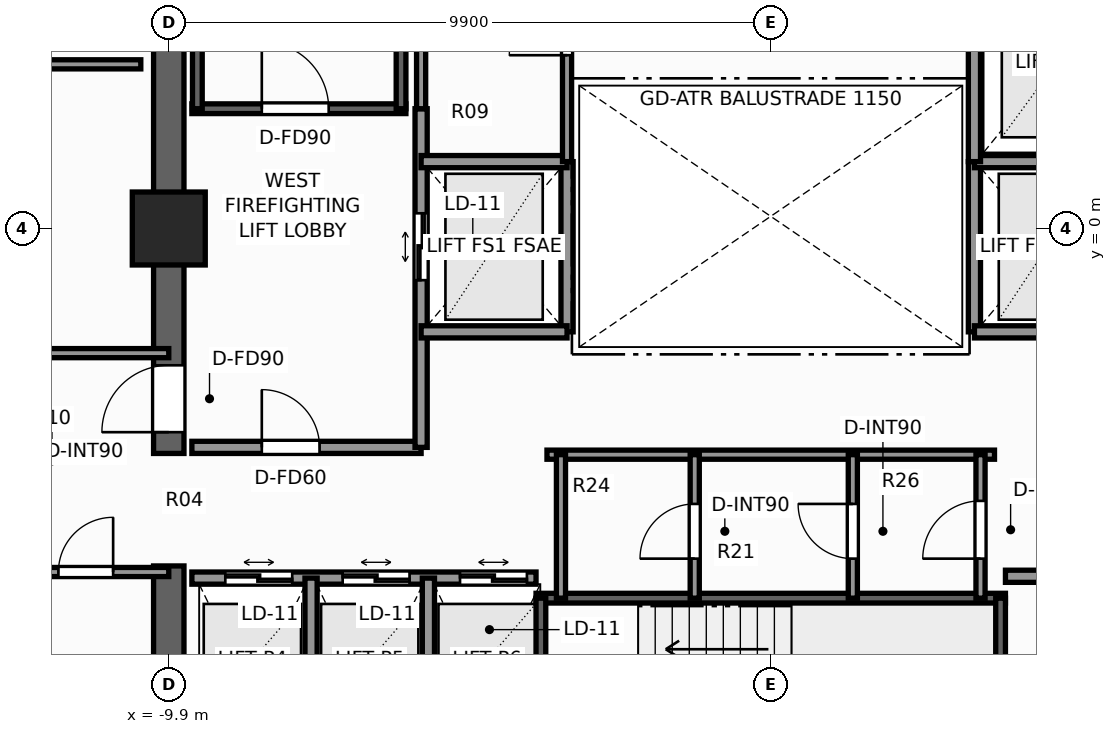
"""IFC4 building model, lengths in metres.
Left out: names, types, materials, properties, quantities, classifications, styles, units other than length and angle.
Written with IfcOpenShell. Run it as: python <this file> out.ifc"""

import sys

from ifc_helpers import new_model, si_unit, direction, frame, frame_2d, origin, origin_2d, place, context, subcontext, project, spatial, rectangle, extrude, element, fill, save


model = new_model("IFC4")
c1 = context("Model", 3, precision=1e-05, world=origin(), true_north=direction((0.0, 1.0)))
c2 = subcontext(c1, "Body", "Model", "MODEL_VIEW")
j1 = project(units=[si_unit("LENGTHUNIT", "METRE"), si_unit("PLANEANGLEUNIT", "RADIAN")], contexts=[c1])
p1 = place(None, origin())
s1 = spatial("IfcSite", under=j1, at=p1, CompositionType="ELEMENT")
p2 = place(p1, origin())
s2 = spatial("IfcBuilding", under=s1, at=p2, CompositionType="ELEMENT")
p3 = place(p2, frame((0.0, 0.0, 111.8)))
s3 = spatial("IfcBuildingStorey", under=s2, at=p3, CompositionType="ELEMENT", Elevation=111.8)
p4 = place(p3, frame((-9.9, -9.65, 0.0), z_axis=(0.0, 0.0, 1.0), x_axis=(0.0, 1.0, 0.0)))
e1 = element("IfcWall", 1, at=p4, inside=s3, PredefinedType="SHEAR", context=c2, shape_type="SweptSolid", body=[
    extrude(rectangle(XDim=4.1, YDim=0.5, at=frame_2d((2.05, 0.0))), origin(), (0.0, 0.0, 1.0), 3.3),
])
p5 = place(p3, frame((-9.9, -3.7, 0.0), z_axis=(0.0, 0.0, 1.0), x_axis=(0.0, 1.0, 0.0)))
e2 = element("IfcWall", 2, at=p5, inside=s3, PredefinedType="SHEAR", context=c2, shape_type="SweptSolid", body=[
    extrude(rectangle(XDim=13.35, YDim=0.5, at=frame_2d((6.675, 0.0))), origin(), (0.0, 0.0, 1.0), 3.3),
])
p6 = place(p5, frame((0.35, 0.0, 0.0)))
e3 = element("IfcOpeningElement", 3, at=p6, cuts=e2, PredefinedType="OPENING", context=c2, shape_type="SweptSolid", body=[
    extrude(rectangle(XDim=1.1, YDim=2.2, at=frame_2d((0.55, 1.1))), frame((0.0, 0.26, 0.0), z_axis=(0.0, -1.0, 0.0), x_axis=(1.0, 0.0, 0.0)), (0.0, 0.0, 1.0), 0.52),
])
p7 = place(p3, frame((-9.9, 0.0, 0.0), z_axis=(0.0, 0.0, 1.0), x_axis=(1.0, 0.0, 0.0)))
e4 = element("IfcColumn", 4, at=p7, inside=s3, PredefinedType="COLUMN", context=c2, shape_type="SweptSolid", body=[
    extrude(rectangle(XDim=1.2, YDim=1.2, at=origin_2d()), origin(), (0.0, 0.0, 1.0), 3.3),
])
p8 = place(p3, frame((-9.52, 1.97, 0.0), z_axis=(0.0, 0.0, 1.0), x_axis=(1.0, 0.0, 0.0)))
e5 = element("IfcWall", 5, at=p8, inside=s3, PredefinedType="SHEAR", context=c2, shape_type="SweptSolid", body=[
    extrude(rectangle(XDim=3.52, YDim=0.16, at=frame_2d((1.76, 0.0))), origin(), (0.0, 0.0, 1.0), 3.3),
])
p9 = place(p8, frame((1.15, 0.0, 0.0)))
e6 = element("IfcOpeningElement", 6, at=p9, cuts=e5, PredefinedType="OPENING", context=c2, shape_type="SweptSolid", body=[
    extrude(rectangle(XDim=1.1, YDim=2.2, at=frame_2d((0.55, 1.1))), frame((0.0, 0.09, 0.0), z_axis=(0.0, -1.0, 0.0), x_axis=(1.0, 0.0, 0.0)), (0.0, 0.0, 1.0), 0.18),
])
for number, where, z_axis, x_axis in (
    (7, (-9.43, 1.97, 0.0), (0.0, 0.0, 1.0), (0.0, 1.0, 0.0)),
    (8, (-6.08, 1.97, 0.0), (0.0, 0.0, 1.0), (0.0, 1.0, 0.0)),
):
    element("IfcWall", number, at=place(p3, frame(where, z_axis=z_axis, x_axis=x_axis)), inside=s3, PredefinedType="SHEAR", context=c2, shape_type="SweptSolid", body=[
        extrude(rectangle(XDim=7.56, YDim=0.16, at=frame_2d((3.78, 0.0))), origin(), (0.0, 0.0, 1.0), 3.3),
    ])
p10 = place(p3, frame((-3.86, -6.08, 0.0), z_axis=(0.0, 0.0, 1.0), x_axis=(1.0, 0.0, 0.0)))
e9 = element("IfcWall", 9, at=p10, inside=s3, PredefinedType="SHEAR", context=c2, shape_type="SweptSolid", body=[
    extrude(rectangle(XDim=7.72, YDim=0.16, at=frame_2d((3.86, 0.0))), origin(), (0.0, 0.0, 1.0), 3.3),
])
for number, where, z_axis, x_axis in (
    (10, (-3.78, -9.43, 0.0), (0.0, 0.0, 1.0), (0.0, 1.0, 0.0)),
    (11, (3.78, -9.43, 0.0), (0.0, 0.0, 1.0), (0.0, 1.0, 0.0)),
):
    element("IfcWall", number, at=place(p3, frame(where, z_axis=z_axis, x_axis=x_axis)), inside=s3, PredefinedType="SHEAR", context=c2, shape_type="SweptSolid", body=[
        extrude(rectangle(XDim=3.35, YDim=0.16, at=frame_2d((1.675, 0.0))), origin(), (0.0, 0.0, 1.0), 3.3),
    ])
p11 = place(p3, frame((-9.52, -3.6, 0.0), z_axis=(0.0, 0.0, 1.0), x_axis=(1.0, 0.0, 0.0)))
e12 = element("IfcWall", 12, at=p11, inside=s3, PredefinedType="SOLIDWALL", context=c2, shape_type="SweptSolid", body=[
    extrude(rectangle(XDim=3.77, YDim=0.2, at=frame_2d((1.885, 0.0))), origin(), (0.0, 0.0, 1.0), 3.08),
])
p12 = place(p11, frame((1.15, 0.0, 0.0)))
e13 = element("IfcOpeningElement", 13, at=p12, cuts=e12, PredefinedType="OPENING", context=c2, shape_type="SweptSolid", body=[
    extrude(rectangle(XDim=0.95, YDim=2.06, at=frame_2d((0.475, 1.03))), frame((0.0, 0.11, 0.0), z_axis=(0.0, -1.0, 0.0), x_axis=(1.0, 0.0, 0.0)), (0.0, 0.0, 1.0), 0.22),
])
p13 = place(p3, frame((-5.75, -3.6, 0.0), z_axis=(0.0, 0.0, 1.0), x_axis=(0.0, 1.0, 0.0)))
e14 = element("IfcWall", 14, at=p13, inside=s3, PredefinedType="SOLIDWALL", context=c2, shape_type="SweptSolid", body=[
    extrude(rectangle(XDim=5.57, YDim=0.2, at=frame_2d((2.785, 0.0))), origin(), (0.0, 0.0, 1.0), 2.715),
])
p14 = place(p13, frame((2.75, 0.0, 0.0)))
e15 = element("IfcOpeningElement", 15, at=p14, cuts=e14, PredefinedType="OPENING", context=c2, shape_type="SweptSolid", body=[
    extrude(rectangle(XDim=1.1, YDim=2.2, at=frame_2d((0.55, 1.1))), frame((0.0, 0.11, 0.0), z_axis=(0.0, -1.0, 0.0), x_axis=(1.0, 0.0, 0.0)), (0.0, 0.0, 1.0), 0.22),
])
p15 = place(p3, frame((-3.35, -1.7, 0.0), z_axis=(0.0, 0.0, 1.0), x_axis=(0.0, 1.0, 0.0)))
e16 = element("IfcWall", 16, at=p15, inside=s3, PredefinedType="SOLIDWALL", context=c2, shape_type="SweptSolid", body=[
    extrude(rectangle(XDim=2.8, YDim=0.2, at=frame_2d((1.4, 0.0))), origin(), (0.0, 0.0, 1.0), 2.715),
])
for number, where, z_axis, x_axis in (
    (17, (-5.75, -1.7, 0.0), (0.0, 0.0, 1.0), (1.0, 0.0, 0.0)),
    (18, (-5.75, 1.1, 0.0), (0.0, 0.0, 1.0), (1.0, 0.0, 0.0)),
):
    element("IfcWall", number, at=place(p3, frame(where, z_axis=z_axis, x_axis=x_axis)), inside=s3, PredefinedType="SOLIDWALL", context=c2, shape_type="SweptSolid", body=[
        extrude(rectangle(XDim=2.4, YDim=0.2, at=frame_2d((1.2, 0.0))), origin(), (0.0, 0.0, 1.0), 3.08),
    ])
p16 = place(p3, frame((3.35, -1.7, 0.0), z_axis=(0.0, 0.0, 1.0), x_axis=(0.0, 1.0, 0.0)))
e19 = element("IfcWall", 19, at=p16, inside=s3, PredefinedType="SOLIDWALL", context=c2, shape_type="SweptSolid", body=[
    extrude(rectangle(XDim=2.8, YDim=0.2, at=frame_2d((1.4, 0.0))), origin(), (0.0, 0.0, 1.0), 2.715),
])
for number, where, z_axis, x_axis in (
    (20, (3.35, -1.7, 0.0), (0.0, 0.0, 1.0), (1.0, 0.0, 0.0)),
    (21, (3.35, 1.1, 0.0), (0.0, 0.0, 1.0), (1.0, 0.0, 0.0)),
):
    element("IfcWall", number, at=place(p3, frame(where, z_axis=z_axis, x_axis=x_axis)), inside=s3, PredefinedType="SOLIDWALL", context=c2, shape_type="SweptSolid", body=[
        extrude(rectangle(XDim=2.4, YDim=0.2, at=frame_2d((1.2, 0.0))), origin(), (0.0, 0.0, 1.0), 3.08),
    ])
p17 = place(p3, frame((3.35, 1.1, 0.0), z_axis=(0.0, 0.0, 1.0), x_axis=(0.0, 1.0, 0.0)))
e22 = element("IfcWall", 22, at=p17, inside=s3, PredefinedType="SOLIDWALL", context=c2, shape_type="SweptSolid", body=[
    extrude(rectangle(XDim=3.2, YDim=0.2, at=frame_2d((1.6, 0.0))), origin(), (0.0, 0.0, 1.0), 2.715),
])
p18 = place(p3, frame((-9.52, -5.75, 0.0), z_axis=(0.0, 0.0, 1.0), x_axis=(1.0, 0.0, 0.0)))
e23 = element("IfcWall", 23, at=p18, inside=s3, PredefinedType="SOLIDWALL", context=c2, shape_type="SweptSolid", body=[
    extrude(rectangle(XDim=5.66, YDim=0.2, at=frame_2d((2.83, 0.0))), origin(), (0.0, 0.0, 1.0), 3.08),
])
p19 = place(p18, frame((0.55, 0.0, 0.0)))
e24 = element("IfcOpeningElement", 24, at=p19, cuts=e23, PredefinedType="OPENING", context=c2, shape_type="SweptSolid", body=[
    extrude(rectangle(XDim=1.1, YDim=2.2, at=frame_2d((0.55, 1.1))), frame((0.0, 0.11, 0.0), z_axis=(0.0, -1.0, 0.0), x_axis=(1.0, 0.0, 0.0)), (0.0, 0.0, 1.0), 0.22),
])
p20 = place(p18, frame((2.48, 0.0, 0.0)))
e25 = element("IfcOpeningElement", 25, at=p20, cuts=e23, PredefinedType="OPENING", context=c2, shape_type="SweptSolid", body=[
    extrude(rectangle(XDim=1.1, YDim=2.2, at=frame_2d((0.55, 1.1))), frame((0.0, 0.11, 0.0), z_axis=(0.0, -1.0, 0.0), x_axis=(1.0, 0.0, 0.0)), (0.0, 0.0, 1.0), 0.22),
])
p21 = place(p18, frame((4.41, 0.0, 0.0)))
e26 = element("IfcOpeningElement", 26, at=p21, cuts=e23, PredefinedType="OPENING", context=c2, shape_type="SweptSolid", body=[
    extrude(rectangle(XDim=1.1, YDim=2.2, at=frame_2d((0.55, 1.1))), frame((0.0, 0.11, 0.0), z_axis=(0.0, -1.0, 0.0), x_axis=(1.0, 0.0, 0.0)), (0.0, 0.0, 1.0), 0.22),
])
for number, where, z_axis, x_axis in (
    (27, (-7.56, -9.52, 0.0), (0.0, 0.0, 1.0), (0.0, 1.0, 0.0)),
    (28, (-5.63, -9.52, 0.0), (0.0, 0.0, 1.0), (0.0, 1.0, 0.0)),
):
    element("IfcWall", number, at=place(p3, frame(where, z_axis=z_axis, x_axis=x_axis)), inside=s3, PredefinedType="SOLIDWALL", context=c2, shape_type="SweptSolid", body=[
        extrude(rectangle(XDim=3.77, YDim=0.2, at=frame_2d((1.885, 0.0))), origin(), (0.0, 0.0, 1.0), 3.08),
    ])
p22 = place(p3, frame((3.86, -5.72, 0.0), z_axis=(0.0, 0.0, 1.0), x_axis=(1.0, 0.0, 0.0)))
e29 = element("IfcWall", 29, at=p22, inside=s3, PredefinedType="SOLIDWALL", context=c2, shape_type="SweptSolid", body=[
    extrude(rectangle(XDim=5.66, YDim=0.2, at=frame_2d((2.83, 0.0))), origin(), (0.0, 0.0, 1.0), 3.08),
])
p23 = place(p22, frame((0.85, 0.0, 0.0)))
e30 = element("IfcOpeningElement", 30, at=p23, cuts=e29, PredefinedType="OPENING", context=c2, shape_type="SweptSolid", body=[
    extrude(rectangle(XDim=0.95, YDim=2.06, at=frame_2d((0.475, 1.03))), frame((0.0, 0.11, 0.0), z_axis=(0.0, -1.0, 0.0), x_axis=(1.0, 0.0, 0.0)), (0.0, 0.0, 1.0), 0.22),
])
p24 = place(p22, frame((3.6, 0.0, 0.0)))
e31 = element("IfcOpeningElement", 31, at=p24, cuts=e29, PredefinedType="OPENING", context=c2, shape_type="SweptSolid", body=[
    extrude(rectangle(XDim=0.85, YDim=2.03, at=frame_2d((0.425, 1.015))), frame((0.0, 0.11, 0.0), z_axis=(0.0, -1.0, 0.0), x_axis=(1.0, 0.0, 0.0)), (0.0, 0.0, 1.0), 0.22),
])
p25 = place(p3, frame((-3.68, -3.72, 0.0), z_axis=(0.0, 0.0, 1.0), x_axis=(1.0, 0.0, 0.0)))
e32 = element("IfcWall", 32, at=p25, inside=s3, PredefinedType="PARTITIONING", context=c2, shape_type="SweptSolid", body=[
    extrude(rectangle(XDim=7.36, YDim=0.15, at=frame_2d((3.68, 0.0))), origin(), (0.0, 0.0, 1.0), 3.08),
])
p26 = place(p3, frame((3.45, -6.08, 0.0), z_axis=(0.0, 0.0, 1.0), x_axis=(0.0, 1.0, 0.0)))
e33 = element("IfcWall", 33, at=p26, inside=s3, PredefinedType="PARTITIONING", context=c2, shape_type="SweptSolid", body=[
    extrude(rectangle(XDim=2.36, YDim=0.15, at=frame_2d((1.18, 0.0))), origin(), (0.0, 0.0, 1.0), 3.08),
])
p27 = place(p26, frame((0.65, 0.0, 0.0)))
e34 = element("IfcOpeningElement", 34, at=p27, cuts=e33, PredefinedType="OPENING", context=c2, shape_type="SweptSolid", body=[
    extrude(rectangle(XDim=0.95, YDim=2.06, at=frame_2d((0.475, 1.03))), frame((0.0, 0.085, 0.0), z_axis=(0.0, -1.0, 0.0), x_axis=(1.0, 0.0, 0.0)), (0.0, 0.0, 1.0), 0.17),
])
p28 = place(p3, frame((-3.45, -6.08, 0.0), z_axis=(0.0, 0.0, 1.0), x_axis=(0.0, 1.0, 0.0)))
e35 = element("IfcWall", 35, at=p28, inside=s3, PredefinedType="PARTITIONING", context=c2, shape_type="SweptSolid", body=[
    extrude(rectangle(XDim=2.36, YDim=0.15, at=frame_2d((1.18, 0.0))), origin(), (0.0, 0.0, 1.0), 3.08),
])
p29 = place(p3, frame((1.35, -6.08, 0.0), z_axis=(0.0, 0.0, 1.0), x_axis=(0.0, 1.0, 0.0)))
e36 = element("IfcWall", 36, at=p29, inside=s3, PredefinedType="PARTITIONING", context=c2, shape_type="SweptSolid", body=[
    extrude(rectangle(XDim=2.36, YDim=0.15, at=frame_2d((1.18, 0.0))), origin(), (0.0, 0.0, 1.0), 3.08),
])
p30 = place(p29, frame((0.65, 0.0, 0.0)))
e37 = element("IfcOpeningElement", 37, at=p30, cuts=e36, PredefinedType="OPENING", context=c2, shape_type="SweptSolid", body=[
    extrude(rectangle(XDim=0.9, YDim=2.06, at=frame_2d((0.45, 1.03))), frame((0.0, 0.085, 0.0), z_axis=(0.0, -1.0, 0.0), x_axis=(1.0, 0.0, 0.0)), (0.0, 0.0, 1.0), 0.17),
])
p31 = place(p3, frame((-1.25, -6.08, 0.0), z_axis=(0.0, 0.0, 1.0), x_axis=(0.0, 1.0, 0.0)))
e38 = element("IfcWall", 38, at=p31, inside=s3, PredefinedType="PARTITIONING", context=c2, shape_type="SweptSolid", body=[
    extrude(rectangle(XDim=2.36, YDim=0.15, at=frame_2d((1.18, 0.0))), origin(), (0.0, 0.0, 1.0), 3.08),
])
p32 = place(p31, frame((0.65, 0.0, 0.0)))
e39 = element("IfcOpeningElement", 39, at=p32, cuts=e38, PredefinedType="OPENING", context=c2, shape_type="SweptSolid", body=[
    extrude(rectangle(XDim=0.9, YDim=2.06, at=frame_2d((0.45, 1.03))), frame((0.0, 0.085, 0.0), z_axis=(0.0, -1.0, 0.0), x_axis=(1.0, 0.0, 0.0)), (0.0, 0.0, 1.0), 0.17),
])
p33 = place(p3, frame((-3.35, 1.1, 0.0), z_axis=(0.0, 0.0, 1.0), x_axis=(0.0, 1.0, 0.0)))
e40 = element("IfcWall", 40, at=p33, inside=s3, PredefinedType="PARTITIONING", context=c2, shape_type="SweptSolid", body=[
    extrude(rectangle(XDim=3.2, YDim=0.15, at=frame_2d((1.6, 0.0))), origin(), (0.0, 0.0, 1.0), 2.715),
])
p34 = place(p33, frame((1.75, 0.0, 0.0)))
e41 = element("IfcOpeningElement", 41, at=p34, cuts=e40, PredefinedType="OPENING", context=c2, shape_type="SweptSolid", body=[
    extrude(rectangle(XDim=0.95, YDim=2.06, at=frame_2d((0.475, 1.03))), frame((0.0, 0.085, 0.0), z_axis=(0.0, -1.0, 0.0), x_axis=(1.0, 0.0, 0.0)), (0.0, 0.0, 1.0), 0.17),
])
p35 = place(p3, frame((-5.75, 1.97, 0.0), z_axis=(0.0, 0.0, 1.0), x_axis=(0.0, 1.0, 0.0)))
e42 = element("IfcWall", 42, at=p35, inside=s3, PredefinedType="PARTITIONING", context=c2, shape_type="SweptSolid", body=[
    extrude(rectangle(XDim=2.33, YDim=0.15, at=frame_2d((1.165, 0.0))), origin(), (0.0, 0.0, 1.0), 2.715),
])
p36 = place(p3, frame((-12.42, -2.05, 0.0), z_axis=(0.0, 0.0, 1.0), x_axis=(1.0, 0.0, 0.0)))
e43 = element("IfcWall", 43, at=p36, inside=s3, PredefinedType="PARTITIONING", context=c2, shape_type="SweptSolid", body=[
    extrude(rectangle(XDim=2.52, YDim=0.15, at=frame_2d((1.26, 0.0))), origin(), (0.0, 0.0, 1.0), 3.08),
])
p37 = place(p3, frame((-12.42, -5.65, 0.0), z_axis=(0.0, 0.0, 1.0), x_axis=(1.0, 0.0, 0.0)))
e44 = element("IfcWall", 44, at=p37, inside=s3, PredefinedType="PARTITIONING", context=c2, shape_type="SweptSolid", body=[
    extrude(rectangle(XDim=2.52, YDim=0.15, at=frame_2d((1.26, 0.0))), origin(), (0.0, 0.0, 1.0), 3.08),
])
p38 = place(p37, frame((0.705, 0.0, 0.0)))
e45 = element("IfcOpeningElement", 45, at=p38, cuts=e44, PredefinedType="OPENING", context=c2, shape_type="SweptSolid", body=[
    extrude(rectangle(XDim=0.9, YDim=2.06, at=frame_2d((0.45, 1.03))), frame((0.0, 0.085, 0.0), z_axis=(0.0, -1.0, 0.0), x_axis=(1.0, 0.0, 0.0)), (0.0, 0.0, 1.0), 0.17),
])
p39 = place(p3, frame((-19.08, 2.7, 0.0), z_axis=(0.0, 0.0, 1.0), x_axis=(1.0, 0.0, 0.0)))
e46 = element("IfcWall", 46, at=p39, inside=s3, PredefinedType="PARTITIONING", context=c2, shape_type="SweptSolid", body=[
    extrude(rectangle(XDim=8.72, YDim=0.15, at=frame_2d((4.36, 0.0))), origin(), (0.0, 0.0, 1.0), 2.449),
])
p40 = place(p9, origin())
e47 = element("IfcDoor", 47, at=p40, inside=s3, OperationType="SINGLE_SWING_LEFT", PredefinedType="DOOR", context=c2, shape_type="SweptSolid", body=[
    extrude(rectangle(XDim=1.1, YDim=2.2, at=frame_2d((0.55, 1.1))), frame((0.0, 0.025, 0.0), z_axis=(0.0, -1.0, 0.0), x_axis=(1.0, 0.0, 0.0)), (0.0, 0.0, 1.0), 0.05),
])
fill(e6, e47)
p41 = place(p6, origin())
e48 = element("IfcDoor", 48, at=p41, inside=s3, OperationType="SINGLE_SWING_LEFT", PredefinedType="DOOR", context=c2, shape_type="SweptSolid", body=[
    extrude(rectangle(XDim=1.1, YDim=2.2, at=frame_2d((0.55, 1.1))), frame((0.0, 0.025, 0.0), z_axis=(0.0, -1.0, 0.0), x_axis=(1.0, 0.0, 0.0)), (0.0, 0.0, 1.0), 0.05),
])
fill(e3, e48)
p42 = place(p14, origin())
e49 = element("IfcDoor", 49, at=p42, inside=s3, OperationType="DOUBLE_DOOR_SLIDING", PredefinedType="DOOR", context=c2, shape_type="SweptSolid", body=[
    extrude(rectangle(XDim=1.1, YDim=2.2, at=frame_2d((0.55, 1.1))), frame((0.0, 0.025, 0.0), z_axis=(0.0, -1.0, 0.0), x_axis=(1.0, 0.0, 0.0)), (0.0, 0.0, 1.0), 0.05),
])
fill(e15, e49)
p43 = place(p19, origin())
e50 = element("IfcDoor", 50, at=p43, inside=s3, OperationType="DOUBLE_DOOR_SLIDING", PredefinedType="DOOR", context=c2, shape_type="SweptSolid", body=[
    extrude(rectangle(XDim=1.1, YDim=2.2, at=frame_2d((0.55, 1.1))), frame((0.0, 0.025, 0.0), z_axis=(0.0, -1.0, 0.0), x_axis=(1.0, 0.0, 0.0)), (0.0, 0.0, 1.0), 0.05),
])
fill(e24, e50)
p44 = place(p20, origin())
e51 = element("IfcDoor", 51, at=p44, inside=s3, OperationType="DOUBLE_DOOR_SLIDING", PredefinedType="DOOR", context=c2, shape_type="SweptSolid", body=[
    extrude(rectangle(XDim=1.1, YDim=2.2, at=frame_2d((0.55, 1.1))), frame((0.0, 0.025, 0.0), z_axis=(0.0, -1.0, 0.0), x_axis=(1.0, 0.0, 0.0)), (0.0, 0.0, 1.0), 0.05),
])
fill(e25, e51)
p45 = place(p21, origin())
e52 = element("IfcDoor", 52, at=p45, inside=s3, OperationType="DOUBLE_DOOR_SLIDING", PredefinedType="DOOR", context=c2, shape_type="SweptSolid", body=[
    extrude(rectangle(XDim=1.1, YDim=2.2, at=frame_2d((0.55, 1.1))), frame((0.0, 0.025, 0.0), z_axis=(0.0, -1.0, 0.0), x_axis=(1.0, 0.0, 0.0)), (0.0, 0.0, 1.0), 0.05),
])
fill(e26, e52)
p46 = place(p12, origin())
e53 = element("IfcDoor", 53, at=p46, inside=s3, OperationType="SINGLE_SWING_LEFT", PredefinedType="DOOR", context=c2, shape_type="SweptSolid", body=[
    extrude(rectangle(XDim=0.95, YDim=2.06, at=frame_2d((0.475, 1.03))), frame((0.0, 0.025, 0.0), z_axis=(0.0, -1.0, 0.0), x_axis=(1.0, 0.0, 0.0)), (0.0, 0.0, 1.0), 0.05),
])
fill(e13, e53)
p47 = place(p27, origin())
e54 = element("IfcDoor", 54, at=p47, inside=s3, OperationType="SINGLE_SWING_LEFT", PredefinedType="DOOR", context=c2, shape_type="SweptSolid", body=[
    extrude(rectangle(XDim=0.95, YDim=2.06, at=frame_2d((0.475, 1.03))), frame((0.0, 0.025, 0.0), z_axis=(0.0, -1.0, 0.0), x_axis=(1.0, 0.0, 0.0)), (0.0, 0.0, 1.0), 0.05),
])
fill(e34, e54)
p48 = place(p30, origin())
e55 = element("IfcDoor", 55, at=p48, inside=s3, OperationType="SINGLE_SWING_RIGHT", PredefinedType="DOOR", context=c2, shape_type="SweptSolid", body=[
    extrude(rectangle(XDim=0.9, YDim=2.06, at=frame_2d((0.45, 1.03))), frame((0.0, 0.025, 0.0), z_axis=(0.0, -1.0, 0.0), x_axis=(1.0, 0.0, 0.0)), (0.0, 0.0, 1.0), 0.05),
])
fill(e37, e55)
p49 = place(p32, origin())
e56 = element("IfcDoor", 56, at=p49, inside=s3, OperationType="SINGLE_SWING_LEFT", PredefinedType="DOOR", context=c2, shape_type="SweptSolid", body=[
    extrude(rectangle(XDim=0.9, YDim=2.06, at=frame_2d((0.45, 1.03))), frame((0.0, 0.025, 0.0), z_axis=(0.0, -1.0, 0.0), x_axis=(1.0, 0.0, 0.0)), (0.0, 0.0, 1.0), 0.05),
])
fill(e39, e56)
p50 = place(p34, origin())
e57 = element("IfcDoor", 57, at=p50, inside=s3, OperationType="SINGLE_SWING_LEFT", PredefinedType="DOOR", context=c2, shape_type="SweptSolid", body=[
    extrude(rectangle(XDim=0.95, YDim=2.06, at=frame_2d((0.475, 1.03))), frame((0.0, 0.025, 0.0), z_axis=(0.0, -1.0, 0.0), x_axis=(1.0, 0.0, 0.0)), (0.0, 0.0, 1.0), 0.05),
])
fill(e41, e57)
p51 = place(p38, origin())
e58 = element("IfcDoor", 58, at=p51, inside=s3, OperationType="SINGLE_SWING_RIGHT", PredefinedType="DOOR", context=c2, shape_type="SweptSolid", body=[
    extrude(rectangle(XDim=0.9, YDim=2.06, at=frame_2d((0.45, 1.03))), frame((0.0, 0.025, 0.0), z_axis=(0.0, -1.0, 0.0), x_axis=(1.0, 0.0, 0.0)), (0.0, 0.0, 1.0), 0.05),
])
fill(e45, e58)
save(model, sys.argv[1])
